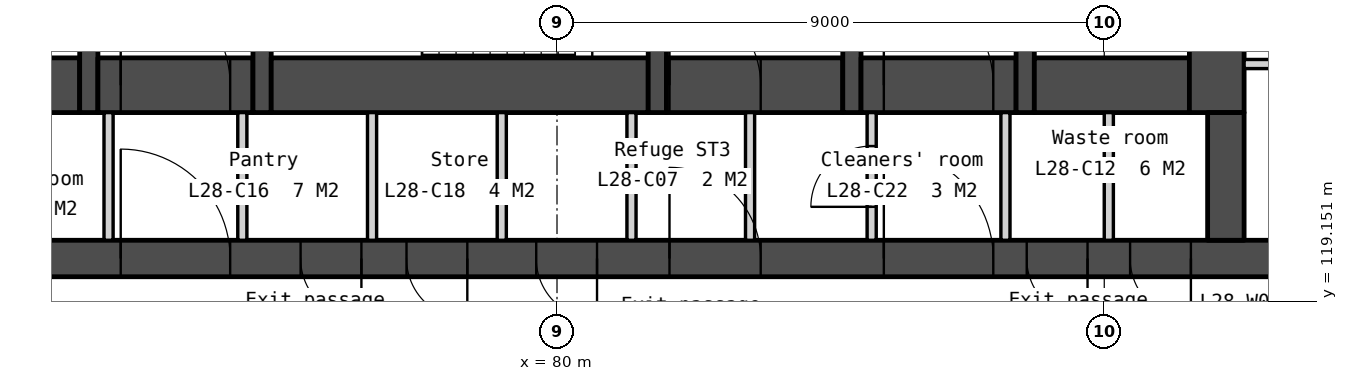
"""IFC4 building model, lengths in metres.
Left out: names, types, materials, properties, quantities, classifications, styles, units other than length and angle.
Written with IfcOpenShell. Run it as: python <this file> out.ifc"""

import sys

from ifc_helpers import new_model, si_unit, direction, frame, frame_2d, origin, place, context, subcontext, project, spatial, polyline, rectangle, outline, extrude, element, fill, save


model = new_model("IFC4")
c1 = context("Model", 3, precision=1e-05, world=origin(), true_north=direction((0.0, 1.0)))
c2 = subcontext(c1, "Body", "Model", "MODEL_VIEW")
j1 = project(units=[si_unit("LENGTHUNIT", "METRE"), si_unit("PLANEANGLEUNIT", "RADIAN")], contexts=[c1])
p1 = place(None, origin())
s1 = spatial("IfcSite", under=j1, at=p1, CompositionType="ELEMENT")
p2 = place(p1, origin())
s2 = spatial("IfcBuilding", under=s1, at=p2, CompositionType="ELEMENT")
p3 = place(p2, frame((0.0, 0.0, 113.3)))
s3 = spatial("IfcBuildingStorey", under=s2, at=p3, CompositionType="ELEMENT", Elevation=113.3)
p4 = place(p3, frame((66.0, 119.85, 0.0), z_axis=(0.0, 0.0, 1.0), x_axis=(1.0, 0.0, 0.0)))
e1 = element("IfcWall", 1, at=p4, inside=s3, PredefinedType="SOLIDWALL", context=c2, shape_type="SweptSolid", body=[
    extrude(rectangle(XDim=28.0, YDim=0.6, at=frame_2d((14.0, 0.0))), origin(), (0.0, 0.0, 1.0), 3.35),
])
p5 = place(p4, frame((6.825, 0.0, 0.0)))
e2 = element("IfcOpeningElement", 2, at=p5, cuts=e1, PredefinedType="OPENING", context=c2, shape_type="SweptSolid", body=[
    extrude(rectangle(XDim=1.8, YDim=2.1, at=frame_2d((0.9, 1.05))), frame((0.0, 0.31, 0.0), z_axis=(0.0, -1.0, 0.0), x_axis=(1.0, 0.0, 0.0)), (0.0, 0.0, 1.0), 0.62),
])
p6 = place(p4, frame((15.85, 0.0, 0.0)))
e3 = element("IfcOpeningElement", 3, at=p6, cuts=e1, PredefinedType="OPENING", context=c2, shape_type="SweptSolid", body=[
    extrude(rectangle(XDim=1.5, YDim=2.1, at=frame_2d((0.75, 1.05))), frame((0.0, 0.31, 0.0), z_axis=(0.0, -1.0, 0.0), x_axis=(1.0, 0.0, 0.0)), (0.0, 0.0, 1.0), 0.62),
])
p7 = place(p4, frame((19.375, 0.0, 0.0)))
e4 = element("IfcOpeningElement", 4, at=p7, cuts=e1, PredefinedType="OPENING", context=c2, shape_type="SweptSolid", body=[
    extrude(rectangle(XDim=1.8, YDim=2.1, at=frame_2d((0.9, 1.05))), frame((0.0, 0.31, 0.0), z_axis=(0.0, -1.0, 0.0), x_axis=(1.0, 0.0, 0.0)), (0.0, 0.0, 1.0), 0.62),
])
p8 = place(p4, frame((4.425, 0.0, 0.0)))
e5 = element("IfcOpeningElement", 5, at=p8, cuts=e1, PredefinedType="OPENING", context=c2, shape_type="SweptSolid", body=[
    extrude(rectangle(XDim=1.0, YDim=2.1, at=frame_2d((0.5, 1.05))), frame((0.0, 0.31, 0.0), z_axis=(0.0, -1.0, 0.0), x_axis=(1.0, 0.0, 0.0)), (0.0, 0.0, 1.0), 0.62),
])
p9 = place(p4, frame((9.783, 0.0, 0.0)))
e6 = element("IfcOpeningElement", 6, at=p9, cuts=e1, PredefinedType="OPENING", context=c2, shape_type="SweptSolid", body=[
    extrude(rectangle(XDim=1.0, YDim=2.1, at=frame_2d((0.5, 1.05))), frame((0.0, 0.31, 0.0), z_axis=(0.0, -1.0, 0.0), x_axis=(1.0, 0.0, 0.0)), (0.0, 0.0, 1.0), 0.62),
])
p10 = place(p4, frame((11.525, 0.0, 0.0)))
e7 = element("IfcOpeningElement", 7, at=p10, cuts=e1, PredefinedType="OPENING", context=c2, shape_type="SweptSolid", body=[
    extrude(rectangle(XDim=1.0, YDim=2.1, at=frame_2d((0.5, 1.05))), frame((0.0, 0.31, 0.0), z_axis=(0.0, -1.0, 0.0), x_axis=(1.0, 0.0, 0.0)), (0.0, 0.0, 1.0), 0.62),
])
p11 = place(p4, frame((13.658, 0.0, 0.0)))
e8 = element("IfcOpeningElement", 8, at=p11, cuts=e1, PredefinedType="OPENING", context=c2, shape_type="SweptSolid", body=[
    extrude(rectangle(XDim=1.0, YDim=2.1, at=frame_2d((0.5, 1.05))), frame((0.0, 0.31, 0.0), z_axis=(0.0, -1.0, 0.0), x_axis=(1.0, 0.0, 0.0)), (0.0, 0.0, 1.0), 0.62),
])
p12 = place(p4, frame((21.725, 0.0, 0.0)))
e9 = element("IfcOpeningElement", 9, at=p12, cuts=e1, PredefinedType="OPENING", context=c2, shape_type="SweptSolid", body=[
    extrude(rectangle(XDim=1.0, YDim=2.1, at=frame_2d((0.5, 1.05))), frame((0.0, 0.31, 0.0), z_axis=(0.0, -1.0, 0.0), x_axis=(1.0, 0.0, 0.0)), (0.0, 0.0, 1.0), 0.62),
])
p13 = place(p4, frame((23.425, 0.0, 0.0)))
e10 = element("IfcOpeningElement", 10, at=p13, cuts=e1, PredefinedType="OPENING", context=c2, shape_type="SweptSolid", body=[
    extrude(rectangle(XDim=1.0, YDim=2.1, at=frame_2d((0.5, 1.05))), frame((0.0, 0.31, 0.0), z_axis=(0.0, -1.0, 0.0), x_axis=(1.0, 0.0, 0.0)), (0.0, 0.0, 1.0), 0.62),
])
p14 = place(p3, frame((69.6, 122.7, 0.0), z_axis=(0.0, 0.0, 1.0), x_axis=(1.0, 0.0, 0.0)))
e11 = element("IfcWall", 11, at=p14, inside=s3, PredefinedType="SOLIDWALL", context=c2, shape_type="SweptSolid", body=[
    extrude(rectangle(XDim=2.55, YDim=0.9, at=frame_2d((1.275, 0.0))), origin(), (0.0, 0.0, 1.0), 3.35),
])
p15 = place(p3, frame((72.3, 133.95, 0.0), z_axis=(0.0, 0.0, 1.0), x_axis=(0.0, -1.0, 0.0)))
e12 = element("IfcWall", 12, at=p15, inside=s3, PredefinedType="SOLIDWALL", context=c2, shape_type="SweptSolid", body=[
    extrude(rectangle(XDim=11.7, YDim=0.3, at=frame_2d((5.85, 0.0))), origin(), (0.0, 0.0, 1.0), 3.35),
])
p16 = place(p15, frame((6.95, 0.0, 0.0)))
e13 = element("IfcOpeningElement", 13, at=p16, cuts=e12, PredefinedType="OPENING", context=c2, shape_type="SweptSolid", body=[
    extrude(rectangle(XDim=1.1, YDim=2.1, at=frame_2d((0.55, 1.05))), frame((0.0, 0.16, 0.0), z_axis=(0.0, -1.0, 0.0), x_axis=(1.0, 0.0, 0.0)), (0.0, 0.0, 1.0), 0.32),
])
p17 = place(p15, frame((9.35, 0.0, 0.0)))
e14 = element("IfcOpeningElement", 14, at=p17, cuts=e12, PredefinedType="OPENING", context=c2, shape_type="SweptSolid", body=[
    extrude(rectangle(XDim=0.9, YDim=2.1, at=frame_2d((0.45, 1.05))), frame((0.0, 0.16, 0.0), z_axis=(0.0, -1.0, 0.0), x_axis=(1.0, 0.0, 0.0)), (0.0, 0.0, 1.0), 0.32),
])
p18 = place(p15, frame((5.1, 0.0, 0.0)))
e15 = element("IfcOpeningElement", 15, at=p18, cuts=e12, PredefinedType="OPENING", context=c2, shape_type="SweptSolid", body=[
    extrude(rectangle(XDim=1.0, YDim=2.1, at=frame_2d((0.5, 1.05))), frame((0.0, 0.16, 0.0), z_axis=(0.0, -1.0, 0.0), x_axis=(1.0, 0.0, 0.0)), (0.0, 0.0, 1.0), 0.32),
])
p19 = place(p3, frame((72.45, 122.7, 0.0), z_axis=(0.0, 0.0, 1.0), x_axis=(1.0, 0.0, 0.0)))
e16 = element("IfcWall", 16, at=p19, inside=s3, PredefinedType="SOLIDWALL", context=c2, shape_type="SweptSolid", body=[
    extrude(rectangle(XDim=2.55, YDim=0.9, at=frame_2d((1.275, 0.0))), origin(), (0.0, 0.0, 1.0), 3.35),
])
p20 = place(p19, frame((0.375, 0.0, 0.0)))
e17 = element("IfcOpeningElement", 17, at=p20, cuts=e16, PredefinedType="OPENING", context=c2, shape_type="SweptSolid", body=[
    extrude(rectangle(XDim=1.8, YDim=2.1, at=frame_2d((0.9, 1.05))), frame((0.0, 0.46, 0.0), z_axis=(0.0, -1.0, 0.0), x_axis=(1.0, 0.0, 0.0)), (0.0, 0.0, 1.0), 0.92),
])
for number, where, z_axis, x_axis in (
    (18, (72.625, 122.25, 0.0), (0.0, 0.0, 1.0), (0.0, -1.0, 0.0)),
    (19, (74.825, 122.25, 0.0), (0.0, 0.0, 1.0), (0.0, -1.0, 0.0)),
):
    element("IfcWall", number, at=place(p3, frame(where, z_axis=z_axis, x_axis=x_axis)), inside=s3, PredefinedType="PARTITIONING", context=c2, shape_type="SweptSolid", body=[
        extrude(rectangle(XDim=2.1, YDim=0.15, at=frame_2d((1.05, 0.0))), origin(), (0.0, 0.0, 1.0), 3.35),
    ])
p21 = place(p3, frame((75.15, 133.95, 0.0), z_axis=(0.0, 0.0, 1.0), x_axis=(0.0, -1.0, 0.0)))
e20 = element("IfcWall", 20, at=p21, inside=s3, PredefinedType="SOLIDWALL", context=c2, shape_type="SweptSolid", body=[
    extrude(rectangle(XDim=11.7, YDim=0.3, at=frame_2d((5.85, 0.0))), origin(), (0.0, 0.0, 1.0), 3.35),
])
p22 = place(p3, frame((75.3, 122.7, 0.0), z_axis=(0.0, 0.0, 1.0), x_axis=(1.0, 0.0, 0.0)))
e21 = element("IfcWall", 21, at=p22, inside=s3, PredefinedType="SOLIDWALL", context=c2, shape_type="SweptSolid", body=[
    extrude(rectangle(XDim=6.2, YDim=0.9, at=frame_2d((3.1, 0.0))), origin(), (0.0, 0.0, 1.0), 3.35),
])
for number, where, z_axis, x_axis in (
    (22, (76.958, 122.25, 0.0), (0.0, 0.0, 1.0), (0.0, -1.0, 0.0)),
    (23, (79.092, 122.25, 0.0), (0.0, 0.0, 1.0), (0.0, -1.0, 0.0)),
    (24, (81.225, 122.25, 0.0), (0.0, 0.0, 1.0), (0.0, -1.0, 0.0)),
):
    element("IfcWall", number, at=place(p3, frame(where, z_axis=z_axis, x_axis=x_axis)), inside=s3, PredefinedType="PARTITIONING", context=c2, shape_type="SweptSolid", body=[
        extrude(rectangle(XDim=2.1, YDim=0.15, at=frame_2d((1.05, 0.0))), origin(), (0.0, 0.0, 1.0), 3.35),
    ])
p23 = place(p3, frame((81.65, 125.7, 0.0), z_axis=(0.0, 0.0, 1.0), x_axis=(0.0, -1.0, 0.0)))
e25 = element("IfcWall", 25, at=p23, inside=s3, PredefinedType="SOLIDWALL", context=c2, shape_type="SweptSolid", body=[
    extrude(rectangle(XDim=3.45, YDim=0.3, at=frame_2d((1.725, 0.0))), origin(), (0.0, 0.0, 1.0), 3.35),
])
p24 = place(p23, frame((0.75, 0.0, 0.0)))
e26 = element("IfcOpeningElement", 26, at=p24, cuts=e25, PredefinedType="OPENING", context=c2, shape_type="SweptSolid", body=[
    extrude(rectangle(XDim=1.0, YDim=2.1, at=frame_2d((0.5, 1.05))), frame((0.0, 0.16, 0.0), z_axis=(0.0, -1.0, 0.0), x_axis=(1.0, 0.0, 0.0)), (0.0, 0.0, 1.0), 0.32),
])
p25 = place(p3, frame((81.8, 122.7, 0.0), z_axis=(0.0, 0.0, 1.0), x_axis=(1.0, 0.0, 0.0)))
e27 = element("IfcWall", 27, at=p25, inside=s3, PredefinedType="SOLIDWALL", context=c2, shape_type="SweptSolid", body=[
    extrude(rectangle(XDim=2.9, YDim=0.9, at=frame_2d((1.45, 0.0))), origin(), (0.0, 0.0, 1.0), 3.35),
])
p26 = place(p25, frame((0.05, 0.0, 0.0)))
e28 = element("IfcOpeningElement", 28, at=p26, cuts=e27, PredefinedType="OPENING", context=c2, shape_type="SweptSolid", body=[
    extrude(rectangle(XDim=1.5, YDim=2.1, at=frame_2d((0.75, 1.05))), frame((0.0, 0.46, 0.0), z_axis=(0.0, -1.0, 0.0), x_axis=(1.0, 0.0, 0.0)), (0.0, 0.0, 1.0), 0.92),
])
p27 = place(p3, frame((83.175, 122.25, 0.0), z_axis=(0.0, 0.0, 1.0), x_axis=(0.0, -1.0, 0.0)))
e29 = element("IfcWall", 29, at=p27, inside=s3, PredefinedType="PARTITIONING", context=c2, shape_type="SweptSolid", body=[
    extrude(rectangle(XDim=2.1, YDim=0.15, at=frame_2d((1.05, 0.0))), origin(), (0.0, 0.0, 1.0), 3.35),
])
p28 = place(p3, frame((84.85, 133.95, 0.0), z_axis=(0.0, 0.0, 1.0), x_axis=(0.0, -1.0, 0.0)))
e30 = element("IfcWall", 30, at=p28, inside=s3, PredefinedType="SOLIDWALL", context=c2, shape_type="SweptSolid", body=[
    extrude(rectangle(XDim=11.7, YDim=0.3, at=frame_2d((5.85, 0.0))), origin(), (0.0, 0.0, 1.0), 3.35),
])
p29 = place(p3, frame((85.0, 122.7, 0.0), z_axis=(0.0, 0.0, 1.0), x_axis=(1.0, 0.0, 0.0)))
e31 = element("IfcWall", 31, at=p29, inside=s3, PredefinedType="SOLIDWALL", context=c2, shape_type="SweptSolid", body=[
    extrude(rectangle(XDim=2.55, YDim=0.9, at=frame_2d((1.275, 0.0))), origin(), (0.0, 0.0, 1.0), 3.35),
])
p30 = place(p29, frame((0.375, 0.0, 0.0)))
e32 = element("IfcOpeningElement", 32, at=p30, cuts=e31, PredefinedType="OPENING", context=c2, shape_type="SweptSolid", body=[
    extrude(rectangle(XDim=1.8, YDim=2.1, at=frame_2d((0.9, 1.05))), frame((0.0, 0.46, 0.0), z_axis=(0.0, -1.0, 0.0), x_axis=(1.0, 0.0, 0.0)), (0.0, 0.0, 1.0), 0.92),
])
p31 = place(p3, frame((85.175, 122.25, 0.0), z_axis=(0.0, 0.0, 1.0), x_axis=(0.0, -1.0, 0.0)))
e33 = element("IfcWall", 33, at=p31, inside=s3, PredefinedType="PARTITIONING", context=c2, shape_type="SweptSolid", body=[
    extrude(rectangle(XDim=2.1, YDim=0.15, at=frame_2d((1.05, 0.0))), origin(), (0.0, 0.0, 1.0), 3.35),
])
p32 = place(p31, frame((0.55, 0.0, 0.0)))
e34 = element("IfcOpeningElement", 34, at=p32, cuts=e33, PredefinedType="OPENING", context=c2, shape_type="SweptSolid", body=[
    extrude(rectangle(XDim=1.0, YDim=2.1, at=frame_2d((0.5, 1.05))), frame((0.0, 0.085, 0.0), z_axis=(0.0, -1.0, 0.0), x_axis=(1.0, 0.0, 0.0)), (0.0, 0.0, 1.0), 0.17),
])
p33 = place(p3, frame((87.375, 122.25, 0.0), z_axis=(0.0, 0.0, 1.0), x_axis=(0.0, -1.0, 0.0)))
e35 = element("IfcWall", 35, at=p33, inside=s3, PredefinedType="PARTITIONING", context=c2, shape_type="SweptSolid", body=[
    extrude(rectangle(XDim=2.1, YDim=0.15, at=frame_2d((1.05, 0.0))), origin(), (0.0, 0.0, 1.0), 3.35),
])
p34 = place(p3, frame((87.7, 133.95, 0.0), z_axis=(0.0, 0.0, 1.0), x_axis=(0.0, -1.0, 0.0)))
e36 = element("IfcWall", 36, at=p34, inside=s3, PredefinedType="SOLIDWALL", context=c2, shape_type="SweptSolid", body=[
    extrude(rectangle(XDim=11.7, YDim=0.3, at=frame_2d((5.85, 0.0))), origin(), (0.0, 0.0, 1.0), 3.35),
])
p35 = place(p34, frame((6.95, 0.0, 0.0)))
e37 = element("IfcOpeningElement", 37, at=p35, cuts=e36, PredefinedType="OPENING", context=c2, shape_type="SweptSolid", body=[
    extrude(rectangle(XDim=1.1, YDim=2.1, at=frame_2d((0.55, 1.05))), frame((0.0, 0.16, 0.0), z_axis=(0.0, -1.0, 0.0), x_axis=(1.0, 0.0, 0.0)), (0.0, 0.0, 1.0), 0.32),
])
p36 = place(p34, frame((5.1, 0.0, 0.0)))
e38 = element("IfcOpeningElement", 38, at=p36, cuts=e36, PredefinedType="OPENING", context=c2, shape_type="SweptSolid", body=[
    extrude(rectangle(XDim=1.0, YDim=2.1, at=frame_2d((0.5, 1.05))), frame((0.0, 0.16, 0.0), z_axis=(0.0, -1.0, 0.0), x_axis=(1.0, 0.0, 0.0)), (0.0, 0.0, 1.0), 0.32),
])
p37 = place(p34, frame((9.25, 0.0, 0.0)))
e39 = element("IfcOpeningElement", 39, at=p37, cuts=e36, PredefinedType="OPENING", context=c2, shape_type="SweptSolid", body=[
    extrude(rectangle(XDim=1.1, YDim=2.1, at=frame_2d((0.55, 1.05))), frame((0.0, 0.16, 0.0), z_axis=(0.0, -1.0, 0.0), x_axis=(1.0, 0.0, 0.0)), (0.0, 0.0, 1.0), 0.32),
])
p38 = place(p3, frame((87.85, 122.7, 0.0), z_axis=(0.0, 0.0, 1.0), x_axis=(1.0, 0.0, 0.0)))
e40 = element("IfcWall", 40, at=p38, inside=s3, PredefinedType="SOLIDWALL", context=c2, shape_type="SweptSolid", body=[
    extrude(rectangle(XDim=2.55, YDim=0.9, at=frame_2d((1.275, 0.0))), origin(), (0.0, 0.0, 1.0), 3.35),
])
p39 = place(p3, frame((89.075, 122.25, 0.0), z_axis=(0.0, 0.0, 1.0), x_axis=(0.0, -1.0, 0.0)))
e41 = element("IfcWall", 41, at=p39, inside=s3, PredefinedType="PARTITIONING", context=c2, shape_type="SweptSolid", body=[
    extrude(rectangle(XDim=2.1, YDim=0.15, at=frame_2d((1.05, 0.0))), origin(), (0.0, 0.0, 1.0), 3.35),
])
p40 = place(p3, frame((90.85, 133.95, 0.0), z_axis=(0.0, 0.0, 1.0), x_axis=(0.0, -1.0, 0.0)))
e42 = element("IfcWall", 42, at=p40, inside=s3, PredefinedType="SOLIDWALL", context=c2, shape_type="SweptSolid", body=[
    extrude(rectangle(XDim=11.7, YDim=0.9, at=frame_2d((5.85, 0.0))), origin(), (0.0, 0.0, 1.0), 3.35),
])
p41 = place(p3, frame((91.0, 122.25, 0.0), z_axis=(0.0, 0.0, 1.0), x_axis=(0.0, -1.0, 0.0)))
e43 = element("IfcWall", 43, at=p41, inside=s3, PredefinedType="SOLIDWALL", context=c2, shape_type="SweptSolid", body=[
    extrude(rectangle(XDim=2.1, YDim=0.6, at=frame_2d((1.05, 0.0))), origin(), (0.0, 0.0, 1.0), 3.35),
])
p42 = place(p3, frame((91.3, 123.049, 0.0), z_axis=(0.0, 0.0, 1.0), x_axis=(1.0, 0.0, 0.0)))
e44 = element("IfcWall", 44, at=p42, inside=s3, PredefinedType="PARTITIONING", context=c2, shape_type="SweptSolid", body=[
    extrude(rectangle(XDim=2.1, YDim=0.15, at=frame_2d((1.05, 0.0))), origin(), (0.0, 0.0, 1.0), 3.35),
])
p43 = place(p3, frame((56.073, 130.263, -0.15), z_axis=(0.0, 0.0, 1.0), x_axis=(0.500000478905, -0.866025127289, 0.0)))
e45 = element("IfcWall", 45, at=p43, inside=s3, PredefinedType="SOLIDWALL", context=c2, shape_type="SweptSolid", body=[
    extrude(outline(polyline([(42.643, 0.0), (42.643, 3.5), (0.0, 3.5), (0.0, 0.0), (42.643, 0.0)])), frame((0.0, 0.225, 0.0), z_axis=(0.0, -1.0, 0.0), x_axis=(1.0, 0.0, 0.0)), (0.0, 0.0, 1.0), 0.45),
])
p44 = place(p43, frame((7.079, 0.0, 1.05)))
e46 = element("IfcOpeningElement", 46, at=p44, cuts=e45, PredefinedType="OPENING", context=c2, shape_type="SweptSolid", body=[
    extrude(rectangle(XDim=1.2, YDim=1.5, at=frame_2d((0.6, 0.75))), frame((0.0, 0.235, 0.0), z_axis=(0.0, -1.0, 0.0), x_axis=(1.0, 0.0, 0.0)), (0.0, 0.0, 1.0), 0.47),
])
p45 = place(p43, frame((8.779, 0.0, 1.05)))
e47 = element("IfcOpeningElement", 47, at=p45, cuts=e45, PredefinedType="OPENING", context=c2, shape_type="SweptSolid", body=[
    extrude(rectangle(XDim=1.2, YDim=1.5, at=frame_2d((0.6, 0.75))), frame((0.0, 0.235, 0.0), z_axis=(0.0, -1.0, 0.0), x_axis=(1.0, 0.0, 0.0)), (0.0, 0.0, 1.0), 0.47),
])
p46 = place(p43, frame((15.607, 0.0, 1.05)))
e48 = element("IfcOpeningElement", 48, at=p46, cuts=e45, PredefinedType="OPENING", context=c2, shape_type="SweptSolid", body=[
    extrude(rectangle(XDim=1.2, YDim=1.5, at=frame_2d((0.6, 0.75))), frame((0.0, 0.235, 0.0), z_axis=(0.0, -1.0, 0.0), x_axis=(1.0, 0.0, 0.0)), (0.0, 0.0, 1.0), 0.47),
])
p47 = place(p43, frame((17.307, 0.0, 1.05)))
e49 = element("IfcOpeningElement", 49, at=p47, cuts=e45, PredefinedType="OPENING", context=c2, shape_type="SweptSolid", body=[
    extrude(rectangle(XDim=1.2, YDim=1.5, at=frame_2d((0.6, 0.75))), frame((0.0, 0.235, 0.0), z_axis=(0.0, -1.0, 0.0), x_axis=(1.0, 0.0, 0.0)), (0.0, 0.0, 1.0), 0.47),
])
p48 = place(p43, frame((24.136, 0.0, 1.05)))
e50 = element("IfcOpeningElement", 50, at=p48, cuts=e45, PredefinedType="OPENING", context=c2, shape_type="SweptSolid", body=[
    extrude(rectangle(XDim=1.2, YDim=1.5, at=frame_2d((0.6, 0.75))), frame((0.0, 0.235, 0.0), z_axis=(0.0, -1.0, 0.0), x_axis=(1.0, 0.0, 0.0)), (0.0, 0.0, 1.0), 0.47),
])
p49 = place(p43, frame((25.836, 0.0, 1.05)))
e51 = element("IfcOpeningElement", 51, at=p49, cuts=e45, PredefinedType="OPENING", context=c2, shape_type="SweptSolid", body=[
    extrude(rectangle(XDim=1.2, YDim=1.5, at=frame_2d((0.6, 0.75))), frame((0.0, 0.235, 0.0), z_axis=(0.0, -1.0, 0.0), x_axis=(1.0, 0.0, 0.0)), (0.0, 0.0, 1.0), 0.47),
])
p50 = place(p43, frame((32.665, 0.0, 1.05)))
e52 = element("IfcOpeningElement", 52, at=p50, cuts=e45, PredefinedType="OPENING", context=c2, shape_type="SweptSolid", body=[
    extrude(rectangle(XDim=1.2, YDim=1.5, at=frame_2d((0.6, 0.75))), frame((0.0, 0.235, 0.0), z_axis=(0.0, -1.0, 0.0), x_axis=(1.0, 0.0, 0.0)), (0.0, 0.0, 1.0), 0.47),
])
p51 = place(p43, frame((34.365, 0.0, 1.05)))
e53 = element("IfcOpeningElement", 53, at=p51, cuts=e45, PredefinedType="OPENING", context=c2, shape_type="SweptSolid", body=[
    extrude(rectangle(XDim=1.2, YDim=1.5, at=frame_2d((0.6, 0.75))), frame((0.0, 0.235, 0.0), z_axis=(0.0, -1.0, 0.0), x_axis=(1.0, 0.0, 0.0)), (0.0, 0.0, 1.0), 0.47),
])
p52 = place(p30, origin())
e54 = element("IfcDoor", 54, at=p52, inside=s3, OperationType="DOUBLE_DOOR_DOUBLE_SWING", PredefinedType="DOOR", context=c2, shape_type="SweptSolid", body=[
    extrude(rectangle(XDim=1.8, YDim=2.1, at=frame_2d((0.9, 1.05))), frame((0.0, 0.025, 0.0), z_axis=(0.0, -1.0, 0.0), x_axis=(1.0, 0.0, 0.0)), (0.0, 0.0, 1.0), 0.05),
])
fill(e32, e54)
p53 = place(p20, origin())
e55 = element("IfcDoor", 55, at=p53, inside=s3, OperationType="DOUBLE_DOOR_DOUBLE_SWING", PredefinedType="DOOR", context=c2, shape_type="SweptSolid", body=[
    extrude(rectangle(XDim=1.8, YDim=2.1, at=frame_2d((0.9, 1.05))), frame((0.0, 0.025, 0.0), z_axis=(0.0, -1.0, 0.0), x_axis=(1.0, 0.0, 0.0)), (0.0, 0.0, 1.0), 0.05),
])
fill(e17, e55)
p54 = place(p26, origin())
e56 = element("IfcDoor", 56, at=p54, inside=s3, OperationType="DOUBLE_DOOR_DOUBLE_SWING", PredefinedType="DOOR", context=c2, shape_type="SweptSolid", body=[
    extrude(rectangle(XDim=1.5, YDim=2.1, at=frame_2d((0.75, 1.05))), frame((0.0, 0.025, 0.0), z_axis=(0.0, -1.0, 0.0), x_axis=(1.0, 0.0, 0.0)), (0.0, 0.0, 1.0), 0.05),
])
fill(e28, e56)
p55 = place(p5, origin())
e57 = element("IfcDoor", 57, at=p55, inside=s3, OperationType="DOUBLE_DOOR_DOUBLE_SWING", PredefinedType="DOOR", context=c2, shape_type="SweptSolid", body=[
    extrude(rectangle(XDim=1.8, YDim=2.1, at=frame_2d((0.9, 1.05))), frame((0.0, 0.025, 0.0), z_axis=(0.0, -1.0, 0.0), x_axis=(1.0, 0.0, 0.0)), (0.0, 0.0, 1.0), 0.05),
])
fill(e2, e57)
p56 = place(p6, origin())
e58 = element("IfcDoor", 58, at=p56, inside=s3, OperationType="DOUBLE_DOOR_DOUBLE_SWING", PredefinedType="DOOR", context=c2, shape_type="SweptSolid", body=[
    extrude(rectangle(XDim=1.5, YDim=2.1, at=frame_2d((0.75, 1.05))), frame((0.0, 0.025, 0.0), z_axis=(0.0, -1.0, 0.0), x_axis=(1.0, 0.0, 0.0)), (0.0, 0.0, 1.0), 0.05),
])
fill(e3, e58)
p57 = place(p7, origin())
e59 = element("IfcDoor", 59, at=p57, inside=s3, OperationType="DOUBLE_DOOR_DOUBLE_SWING", PredefinedType="DOOR", context=c2, shape_type="SweptSolid", body=[
    extrude(rectangle(XDim=1.8, YDim=2.1, at=frame_2d((0.9, 1.05))), frame((0.0, 0.025, 0.0), z_axis=(0.0, -1.0, 0.0), x_axis=(1.0, 0.0, 0.0)), (0.0, 0.0, 1.0), 0.05),
])
fill(e4, e59)
p58 = place(p9, origin())
e60 = element("IfcDoor", 60, at=p58, inside=s3, OperationType="SINGLE_SWING_RIGHT", PredefinedType="DOOR", context=c2, shape_type="SweptSolid", body=[
    extrude(rectangle(XDim=1.0, YDim=2.1, at=frame_2d((0.5, 1.05))), frame((0.0, 0.025, 0.0), z_axis=(0.0, -1.0, 0.0), x_axis=(1.0, 0.0, 0.0)), (0.0, 0.0, 1.0), 0.05),
])
fill(e6, e60)
p59 = place(p10, origin())
e61 = element("IfcDoor", 61, at=p59, inside=s3, OperationType="SINGLE_SWING_RIGHT", PredefinedType="DOOR", context=c2, shape_type="SweptSolid", body=[
    extrude(rectangle(XDim=1.0, YDim=2.1, at=frame_2d((0.5, 1.05))), frame((0.0, 0.025, 0.0), z_axis=(0.0, -1.0, 0.0), x_axis=(1.0, 0.0, 0.0)), (0.0, 0.0, 1.0), 0.05),
])
fill(e7, e61)
p60 = place(p11, origin())
e62 = element("IfcDoor", 62, at=p60, inside=s3, OperationType="SINGLE_SWING_RIGHT", PredefinedType="DOOR", context=c2, shape_type="SweptSolid", body=[
    extrude(rectangle(XDim=1.0, YDim=2.1, at=frame_2d((0.5, 1.05))), frame((0.0, 0.025, 0.0), z_axis=(0.0, -1.0, 0.0), x_axis=(1.0, 0.0, 0.0)), (0.0, 0.0, 1.0), 0.05),
])
fill(e8, e62)
p61 = place(p32, origin())
e63 = element("IfcDoor", 63, at=p61, inside=s3, OperationType="SINGLE_SWING_RIGHT", PredefinedType="DOOR", context=c2, shape_type="SweptSolid", body=[
    extrude(rectangle(XDim=1.0, YDim=2.1, at=frame_2d((0.5, 1.05))), frame((0.0, 0.025, 0.0), z_axis=(0.0, -1.0, 0.0), x_axis=(1.0, 0.0, 0.0)), (0.0, 0.0, 1.0), 0.05),
])
fill(e34, e63)
p62 = place(p12, origin())
e64 = element("IfcDoor", 64, at=p62, inside=s3, OperationType="SINGLE_SWING_RIGHT", PredefinedType="DOOR", context=c2, shape_type="SweptSolid", body=[
    extrude(rectangle(XDim=1.0, YDim=2.1, at=frame_2d((0.5, 1.05))), frame((0.0, 0.025, 0.0), z_axis=(0.0, -1.0, 0.0), x_axis=(1.0, 0.0, 0.0)), (0.0, 0.0, 1.0), 0.05),
])
fill(e9, e64)
p63 = place(p13, origin())
e65 = element("IfcDoor", 65, at=p63, inside=s3, OperationType="SINGLE_SWING_RIGHT", PredefinedType="DOOR", context=c2, shape_type="SweptSolid", body=[
    extrude(rectangle(XDim=1.0, YDim=2.1, at=frame_2d((0.5, 1.05))), frame((0.0, 0.025, 0.0), z_axis=(0.0, -1.0, 0.0), x_axis=(1.0, 0.0, 0.0)), (0.0, 0.0, 1.0), 0.05),
])
fill(e10, e65)
save(model, sys.argv[1])
